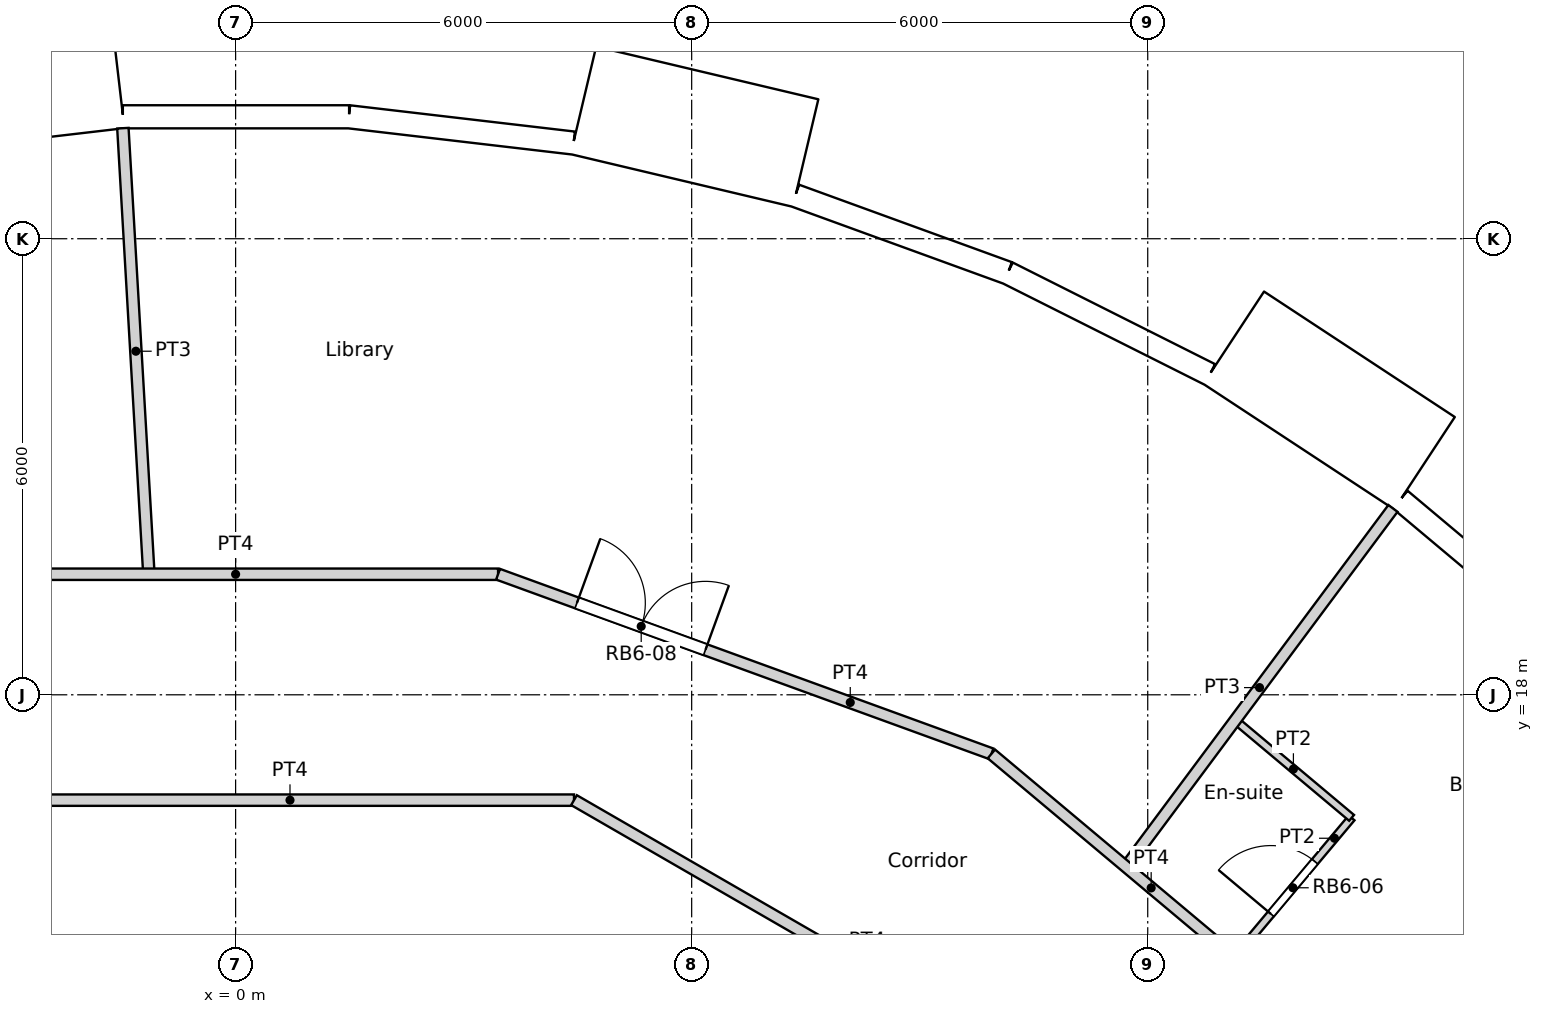
"""IFC4 building model, lengths in metres.
Left out: names, types, materials, properties, quantities, classifications, styles, units other than length and angle.
Written with IfcOpenShell. Run it as: python <this file> out.ifc"""

import sys

from ifc_helpers import new_model, si_unit, direction, frame, frame_2d, origin, origin_2d, place, context, subcontext, project, spatial, rectangle, circle, extrude, element, fill, save


model = new_model("IFC4")
c1 = context("Model", 3, precision=1e-05, world=origin(), true_north=direction((0.0, 1.0)))
c2 = subcontext(c1, "Body", "Model", "MODEL_VIEW")
j1 = project(units=[si_unit("LENGTHUNIT", "METRE"), si_unit("PLANEANGLEUNIT", "RADIAN")], contexts=[c1])
p1 = place(None, origin())
s1 = spatial("IfcSite", under=j1, at=p1, CompositionType="ELEMENT")
p2 = place(p1, origin())
s2 = spatial("IfcBuilding", under=s1, at=p2, CompositionType="ELEMENT")
p3 = place(p2, frame((0.0, 0.0, 180.0)))
s3 = spatial("IfcBuildingStorey", under=s2, at=p3, CompositionType="ELEMENT", Elevation=180.0)
for number, where, z_axis, x_axis in (
    (1, (14.659, 19.69, 0.0), (0.0, 0.0, 1.0), (1.0, 0.0, 0.0)),
    (2, (9.723, 22.54, 0.0), (0.0, 0.0, 1.0), (1.0, 0.0, 0.0)),
    (3, (4.263, 24.175, 0.0), (0.0, 0.0, 1.0), (1.0, 0.0, 0.0)),
    (4, (-1.427, 24.506, 0.0), (0.0, 0.0, 1.0), (1.0, 0.0, 0.0)),
):
    element("IfcColumn", number, at=place(p3, frame(where, z_axis=z_axis, x_axis=x_axis)), inside=s3, PredefinedType="COLUMN", context=c2, shape_type="SweptSolid", body=[
        extrude(circle(Radius=0.6, at=origin_2d()), origin(), (0.0, 0.0, 1.0), 3.6),
    ])
for number, where, z_axis, x_axis in (
    (5, (11.735, 14.716, 0.0), (0.0, 0.0, 1.0), (1.0, 0.0, 0.0)),
    (6, (6.876, 17.521, 0.0), (0.0, 0.0, 1.0), (1.0, 0.0, 0.0)),
    (7, (1.406, 18.77, 0.0), (0.0, 0.0, 1.0), (1.0, 0.0, 0.0)),
):
    element("IfcColumn", number, at=place(p3, frame(where, z_axis=z_axis, x_axis=x_axis)), inside=s3, PredefinedType="COLUMN", context=c2, shape_type="SweptSolid", body=[
        extrude(circle(Radius=0.65, at=origin_2d()), origin(), (0.0, 0.0, 1.0), 3.6),
    ])
p4 = place(p3, frame((17.6, 18.655, 0.0), z_axis=(0.0, 0.0, 1.0), x_axis=(-0.766049350637, 0.642781761089, 0.0)))
e8 = element("IfcWall", 8, at=p4, inside=s3, PredefinedType="SOLIDWALL", context=c2, shape_type="SweptSolid", body=[
    extrude(rectangle(XDim=2.973, YDim=0.3, at=frame_2d((1.486, 0.0))), origin(), (0.0, 0.0, 1.0), 3.3),
])
p5 = place(p4, frame((1.486, 0.0, 1.55)))
e9 = element("IfcOpeningElement", 9, at=p5, cuts=e8, PredefinedType="OPENING", context=c2, shape_type="SweptSolid", body=[
    extrude(circle(Radius=0.9, at=origin_2d()), frame((0.0, 0.16, 0.0), z_axis=(0.0, -1.0, 0.0), x_axis=(1.0, 0.0, 0.0)), (0.0, 0.0, 1.0), 0.32),
])
p6 = place(p3, frame((15.639, 21.048, -0.3), z_axis=(0.0, 0.0, 1.0), x_axis=(-0.835514416706, 0.549468524554, 0.0)))
e10 = element("IfcWall", 10, at=p6, inside=s3, PredefinedType="ELEMENTEDWALL", context=c2, shape_type="SweptSolid", body=[
    extrude(rectangle(XDim=3.0, YDim=1.45, at=frame_2d((1.5, 0.0))), origin(), (0.0, 0.0, 1.0), 3.6),
])
p7 = place(p6, frame((1.5, 0.0, 1.85)))
e11 = element("IfcOpeningElement", 11, at=p7, cuts=e10, PredefinedType="OPENING", context=c2, shape_type="SweptSolid", body=[
    extrude(circle(Radius=0.9, at=origin_2d()), frame((0.0, 0.735, 0.0), z_axis=(0.0, -1.0, 0.0), x_axis=(1.0, 0.0, 0.0)), (0.0, 0.0, 1.0), 1.47),
])
p8 = place(p3, frame((12.815, 22.216, 0.0), z_axis=(0.0, 0.0, 1.0), x_axis=(-0.893637442555, 0.448789618045, 0.0)))
e12 = element("IfcWall", 12, at=p8, inside=s3, PredefinedType="SOLIDWALL", context=c2, shape_type="SweptSolid", body=[
    extrude(rectangle(XDim=2.973, YDim=0.3, at=frame_2d((1.486, 0.0))), origin(), (0.0, 0.0, 1.0), 3.3),
])
p9 = place(p8, frame((1.486, 0.0, 1.55)))
e13 = element("IfcOpeningElement", 13, at=p9, cuts=e12, PredefinedType="OPENING", context=c2, shape_type="SweptSolid", body=[
    extrude(circle(Radius=0.9, at=origin_2d()), frame((0.0, 0.16, 0.0), z_axis=(0.0, -1.0, 0.0), x_axis=(1.0, 0.0, 0.0)), (0.0, 0.0, 1.0), 0.32),
])
p10 = place(p3, frame((10.158, 23.55, 0.0), z_axis=(0.0, 0.0, 1.0), x_axis=(-0.939690282133, 0.342026568652, 0.0)))
e14 = element("IfcWall", 14, at=p10, inside=s3, PredefinedType="SOLIDWALL", context=c2, shape_type="SweptSolid", body=[
    extrude(rectangle(XDim=2.973, YDim=0.3, at=frame_2d((1.486, 0.0))), origin(), (0.0, 0.0, 1.0), 3.3),
])
p11 = place(p10, frame((1.486, 0.0, 1.55)))
e15 = element("IfcOpeningElement", 15, at=p11, cuts=e14, PredefinedType="OPENING", context=c2, shape_type="SweptSolid", body=[
    extrude(circle(Radius=0.9, at=origin_2d()), frame((0.0, 0.16, 0.0), z_axis=(0.0, -1.0, 0.0), x_axis=(1.0, 0.0, 0.0)), (0.0, 0.0, 1.0), 0.32),
])
p12 = place(p3, frame((7.497, 25.127, -0.3), z_axis=(0.0, 0.0, 1.0), x_axis=(-0.973042333261, 0.23062657627, 0.0)))
e16 = element("IfcWall", 16, at=p12, inside=s3, PredefinedType="ELEMENTEDWALL", context=c2, shape_type="SweptSolid", body=[
    extrude(rectangle(XDim=3.0, YDim=1.45, at=frame_2d((1.5, 0.0))), origin(), (0.0, 0.0, 1.0), 3.6),
])
p13 = place(p12, frame((1.5, 0.0, 1.85)))
e17 = element("IfcOpeningElement", 17, at=p13, cuts=e16, PredefinedType="OPENING", context=c2, shape_type="SweptSolid", body=[
    extrude(circle(Radius=0.9, at=origin_2d()), frame((0.0, 0.735, 0.0), z_axis=(0.0, -1.0, 0.0), x_axis=(1.0, 0.0, 0.0)), (0.0, 0.0, 1.0), 1.47),
])
p14 = place(p3, frame((4.444, 25.259, 0.0), z_axis=(0.0, 0.0, 1.0), x_axis=(-0.993245010522, 0.1160359818, 0.0)))
e18 = element("IfcWall", 18, at=p14, inside=s3, PredefinedType="SOLIDWALL", context=c2, shape_type="SweptSolid", body=[
    extrude(rectangle(XDim=2.973, YDim=0.3, at=frame_2d((1.486, 0.0))), origin(), (0.0, 0.0, 1.0), 3.3),
])
p15 = place(p14, frame((1.486, 0.0, 1.55)))
e19 = element("IfcOpeningElement", 19, at=p15, cuts=e18, PredefinedType="OPENING", context=c2, shape_type="SweptSolid", body=[
    extrude(circle(Radius=0.9, at=origin_2d()), frame((0.0, 0.16, 0.0), z_axis=(0.0, -1.0, 0.0), x_axis=(1.0, 0.0, 0.0)), (0.0, 0.0, 1.0), 0.32),
])
p16 = place(p3, frame((1.491, 25.604, 0.0), z_axis=(0.0, 0.0, 1.0), x_axis=(-1.0, 0.0, 0.0)))
e20 = element("IfcWall", 20, at=p16, inside=s3, PredefinedType="SOLIDWALL", context=c2, shape_type="SweptSolid", body=[
    extrude(rectangle(XDim=2.973, YDim=0.3, at=frame_2d((1.486, 0.0))), origin(), (0.0, 0.0, 1.0), 3.3),
])
p17 = place(p16, frame((1.486, 0.0, 1.55)))
e21 = element("IfcOpeningElement", 21, at=p17, cuts=e20, PredefinedType="OPENING", context=c2, shape_type="SweptSolid", body=[
    extrude(circle(Radius=0.9, at=origin_2d()), frame((0.0, 0.16, 0.0), z_axis=(0.0, -1.0, 0.0), x_axis=(1.0, 0.0, 0.0)), (0.0, 0.0, 1.0), 0.32),
])
p18 = place(p3, frame((-1.549, 26.176, -0.3), z_axis=(0.0, 0.0, 1.0), x_axis=(-0.9932342274, -0.116128246006, 0.0)))
e22 = element("IfcWall", 22, at=p18, inside=s3, PredefinedType="ELEMENTEDWALL", context=c2, shape_type="SweptSolid", body=[
    extrude(rectangle(XDim=3.0, YDim=1.45, at=frame_2d((1.5, 0.0))), origin(), (0.0, 0.0, 1.0), 3.6),
])
p19 = place(p18, frame((1.5, 0.0, 1.85)))
e23 = element("IfcOpeningElement", 23, at=p19, cuts=e22, PredefinedType="OPENING", context=c2, shape_type="SweptSolid", body=[
    extrude(circle(Radius=0.9, at=origin_2d()), frame((0.0, 0.735, 0.0), z_axis=(0.0, -1.0, 0.0), x_axis=(1.0, 0.0, 0.0)), (0.0, 0.0, 1.0), 1.47),
])
p20 = place(p3, frame((9.943, 17.222, 0.0), z_axis=(0.0, 0.0, 1.0), x_axis=(0.766192104565, -0.642611592567, 0.0)))
e24 = element("IfcWall", 24, at=p20, inside=s3, PredefinedType="PARTITIONING", context=c2, shape_type="SweptSolid", body=[
    extrude(rectangle(XDim=6.906, YDim=0.15, at=frame_2d((3.453, 0.0))), origin(), (0.0, 0.0, 1.0), 3.3),
])
p21 = place(p20, frame((5.537, 0.0, 0.0)))
e25 = element("IfcOpeningElement", 25, at=p21, cuts=e24, PredefinedType="OPENING", context=c2, shape_type="SweptSolid", body=[
    extrude(rectangle(XDim=1.0, YDim=2.1, at=frame_2d((0.5, 1.05))), frame((0.0, 0.075, 0.0), z_axis=(0.0, -1.0, 0.0), x_axis=(1.0, 0.0, 0.0)), (0.0, 0.0, 1.0), 0.15),
])
p22 = place(p3, frame((4.452, 16.614, 0.0), z_axis=(0.0, 0.0, 1.0), x_axis=(0.866005203721, -0.500034985904, 0.0)))
e26 = element("IfcWall", 26, at=p22, inside=s3, PredefinedType="PARTITIONING", context=c2, shape_type="SweptSolid", body=[
    extrude(rectangle(XDim=8.903, YDim=0.15, at=frame_2d((4.452, 0.0))), origin(), (0.0, 0.0, 1.0), 3.3),
])
p23 = place(p3, frame((-3.021, 16.614, 0.0), z_axis=(0.0, 0.0, 1.0), x_axis=(1.0, 0.0, 0.0)))
e27 = element("IfcWall", 27, at=p23, inside=s3, PredefinedType="PARTITIONING", context=c2, shape_type="SweptSolid", body=[
    extrude(rectangle(XDim=7.473, YDim=0.15, at=frame_2d((3.736, 0.0))), origin(), (0.0, 0.0, 1.0), 3.3),
])
p24 = place(p3, frame((-3.453, 19.586, 0.0), z_axis=(0.0, 0.0, 1.0), x_axis=(1.0, 0.0, 0.0)))
e28 = element("IfcWall", 28, at=p24, inside=s3, PredefinedType="PARTITIONING", context=c2, shape_type="SweptSolid", body=[
    extrude(rectangle(XDim=6.906, YDim=0.15, at=frame_2d((3.453, 0.0))), origin(), (0.0, 0.0, 1.0), 3.3),
])
p25 = place(p3, frame((3.453, 19.586, 0.0), z_axis=(0.0, 0.0, 1.0), x_axis=(0.939672634566, -0.342075050021, 0.0)))
e29 = element("IfcWall", 29, at=p25, inside=s3, PredefinedType="PARTITIONING", context=c2, shape_type="SweptSolid", body=[
    extrude(rectangle(XDim=6.908, YDim=0.15, at=frame_2d((3.454, 0.0))), origin(), (0.0, 0.0, 1.0), 3.3),
])
p26 = place(p25, frame((1.104, 0.0, 0.0)))
e30 = element("IfcOpeningElement", 30, at=p26, cuts=e29, PredefinedType="OPENING", context=c2, shape_type="SweptSolid", body=[
    extrude(rectangle(XDim=1.8, YDim=2.1, at=frame_2d((0.9, 1.05))), frame((0.0, 0.075, 0.0), z_axis=(0.0, -1.0, 0.0), x_axis=(1.0, 0.0, 0.0)), (0.0, 0.0, 1.0), 0.15),
])
p27 = place(p3, frame((15.235, 12.784, 0.0), z_axis=(0.0, 0.0, 1.0), x_axis=(0.76609059793, 0.642732600514, 0.0)))
e31 = element("IfcWall", 31, at=p27, inside=s3, PredefinedType="PARTITIONING", context=c2, shape_type="SweptSolid", body=[
    extrude(rectangle(XDim=5.609, YDim=0.15, at=frame_2d((2.804, 0.0))), origin(), (0.0, 0.0, 1.0), 3.3),
])
p28 = place(p3, frame((13.139, 14.542, 0.0), z_axis=(0.0, 0.0, 1.0), x_axis=(0.642731657745, 0.766091388891, 0.0)))
e32 = element("IfcWall", 32, at=p28, inside=s3, PredefinedType="PARTITIONING", context=c2, shape_type="SweptSolid", body=[
    extrude(rectangle(XDim=2.401, YDim=0.1, at=frame_2d((1.2, 0.0))), origin(), (0.0, 0.0, 1.0), 3.3),
])
p29 = place(p28, frame((0.75, 0.0, 0.0)))
e33 = element("IfcOpeningElement", 33, at=p29, cuts=e32, PredefinedType="OPENING", context=c2, shape_type="SweptSolid", body=[
    extrude(rectangle(XDim=0.9, YDim=2.04, at=frame_2d((0.45, 1.02))), frame((0.0, 0.05, 0.0), z_axis=(0.0, -1.0, 0.0), x_axis=(1.0, 0.0, 0.0)), (0.0, 0.0, 1.0), 0.1),
])
p30 = place(p3, frame((13.151, 17.665, 0.0), z_axis=(0.0, 0.0, 1.0), x_axis=(0.766224532916, -0.642572925945, 0.0)))
e34 = element("IfcWall", 34, at=p30, inside=s3, PredefinedType="PARTITIONING", context=c2, shape_type="SweptSolid", body=[
    extrude(rectangle(XDim=1.998, YDim=0.1, at=frame_2d((0.999, 0.0))), origin(), (0.0, 0.0, 1.0), 3.3),
])
p31 = place(p3, frame((11.716, 15.737, 0.0), z_axis=(0.0, 0.0, 1.0), x_axis=(0.597198494348, 0.802093484793, 0.0)))
e35 = element("IfcWall", 35, at=p31, inside=s3, PredefinedType="PARTITIONING", context=c2, shape_type="SweptSolid", body=[
    extrude(rectangle(XDim=5.878, YDim=0.15, at=frame_2d((2.939, 0.0))), origin(), (0.0, 0.0, 1.0), 3.3),
])
p32 = place(p3, frame((-1.483, 25.454, 0.0), z_axis=(0.0, 0.0, 1.0), x_axis=(0.058147412668, -0.998308007781, 0.0)))
e36 = element("IfcWall", 36, at=p32, inside=s3, PredefinedType="PARTITIONING", context=c2, shape_type="SweptSolid", body=[
    extrude(rectangle(XDim=5.878, YDim=0.15, at=frame_2d((2.939, 0.0))), origin(), (0.0, 0.0, 1.0), 3.3),
])
p33 = place(p5, origin())
e37 = element("IfcWindow", 37, at=p33, inside=s3, PartitioningType="SINGLE_PANEL", PredefinedType="WINDOW", context=c2, shape_type="SweptSolid", body=[
    extrude(circle(Radius=0.9, at=origin_2d()), frame((0.0, 0.12, 0.0), z_axis=(0.0, -1.0, 0.0), x_axis=(1.0, 0.0, 0.0)), (0.0, 0.0, 1.0), 0.1),
])
fill(e9, e37)
p34 = place(p7, origin())
e38 = element("IfcWindow", 38, at=p34, inside=s3, PartitioningType="SINGLE_PANEL", PredefinedType="WINDOW", context=c2, shape_type="SweptSolid", body=[
    extrude(circle(Radius=0.9, at=origin_2d()), frame((0.0, 0.695, 0.0), z_axis=(0.0, -1.0, 0.0), x_axis=(1.0, 0.0, 0.0)), (0.0, 0.0, 1.0), 0.1),
])
fill(e11, e38)
p35 = place(p9, origin())
e39 = element("IfcWindow", 39, at=p35, inside=s3, PartitioningType="SINGLE_PANEL", PredefinedType="WINDOW", context=c2, shape_type="SweptSolid", body=[
    extrude(circle(Radius=0.9, at=origin_2d()), frame((0.0, 0.12, 0.0), z_axis=(0.0, -1.0, 0.0), x_axis=(1.0, 0.0, 0.0)), (0.0, 0.0, 1.0), 0.1),
])
fill(e13, e39)
p36 = place(p11, origin())
e40 = element("IfcWindow", 40, at=p36, inside=s3, PartitioningType="SINGLE_PANEL", PredefinedType="WINDOW", context=c2, shape_type="SweptSolid", body=[
    extrude(circle(Radius=0.9, at=origin_2d()), frame((0.0, 0.12, 0.0), z_axis=(0.0, -1.0, 0.0), x_axis=(1.0, 0.0, 0.0)), (0.0, 0.0, 1.0), 0.1),
])
fill(e15, e40)
p37 = place(p13, origin())
e41 = element("IfcWindow", 41, at=p37, inside=s3, PartitioningType="SINGLE_PANEL", PredefinedType="WINDOW", context=c2, shape_type="SweptSolid", body=[
    extrude(circle(Radius=0.9, at=origin_2d()), frame((0.0, 0.695, 0.0), z_axis=(0.0, -1.0, 0.0), x_axis=(1.0, 0.0, 0.0)), (0.0, 0.0, 1.0), 0.1),
])
fill(e17, e41)
p38 = place(p15, origin())
e42 = element("IfcWindow", 42, at=p38, inside=s3, PartitioningType="SINGLE_PANEL", PredefinedType="WINDOW", context=c2, shape_type="SweptSolid", body=[
    extrude(circle(Radius=0.9, at=origin_2d()), frame((0.0, 0.12, 0.0), z_axis=(0.0, -1.0, 0.0), x_axis=(1.0, 0.0, 0.0)), (0.0, 0.0, 1.0), 0.1),
])
fill(e19, e42)
p39 = place(p17, origin())
e43 = element("IfcWindow", 43, at=p39, inside=s3, PartitioningType="SINGLE_PANEL", PredefinedType="WINDOW", context=c2, shape_type="SweptSolid", body=[
    extrude(circle(Radius=0.9, at=origin_2d()), frame((0.0, 0.12, 0.0), z_axis=(0.0, -1.0, 0.0), x_axis=(1.0, 0.0, 0.0)), (0.0, 0.0, 1.0), 0.1),
])
fill(e21, e43)
p40 = place(p19, origin())
e44 = element("IfcWindow", 44, at=p40, inside=s3, PartitioningType="SINGLE_PANEL", PredefinedType="WINDOW", context=c2, shape_type="SweptSolid", body=[
    extrude(circle(Radius=0.9, at=origin_2d()), frame((0.0, 0.695, 0.0), z_axis=(0.0, -1.0, 0.0), x_axis=(1.0, 0.0, 0.0)), (0.0, 0.0, 1.0), 0.1),
])
fill(e23, e44)
p41 = place(p29, origin())
e45 = element("IfcDoor", 45, at=p41, inside=s3, OperationType="SINGLE_SWING_LEFT", PredefinedType="DOOR", context=c2, shape_type="SweptSolid", body=[
    extrude(rectangle(XDim=0.9, YDim=2.04, at=frame_2d((0.45, 1.02))), frame((0.0, 0.025, 0.0), z_axis=(0.0, -1.0, 0.0), x_axis=(1.0, 0.0, 0.0)), (0.0, 0.0, 1.0), 0.05),
])
fill(e33, e45)
p42 = place(p26, origin())
e46 = element("IfcDoor", 46, at=p42, inside=s3, OperationType="DOUBLE_DOOR_SINGLE_SWING", PredefinedType="DOOR", context=c2, shape_type="SweptSolid", body=[
    extrude(rectangle(XDim=1.8, YDim=2.1, at=frame_2d((0.9, 1.05))), frame((0.0, 0.025, 0.0), z_axis=(0.0, -1.0, 0.0), x_axis=(1.0, 0.0, 0.0)), (0.0, 0.0, 1.0), 0.05),
])
fill(e30, e46)
save(model, sys.argv[1])
